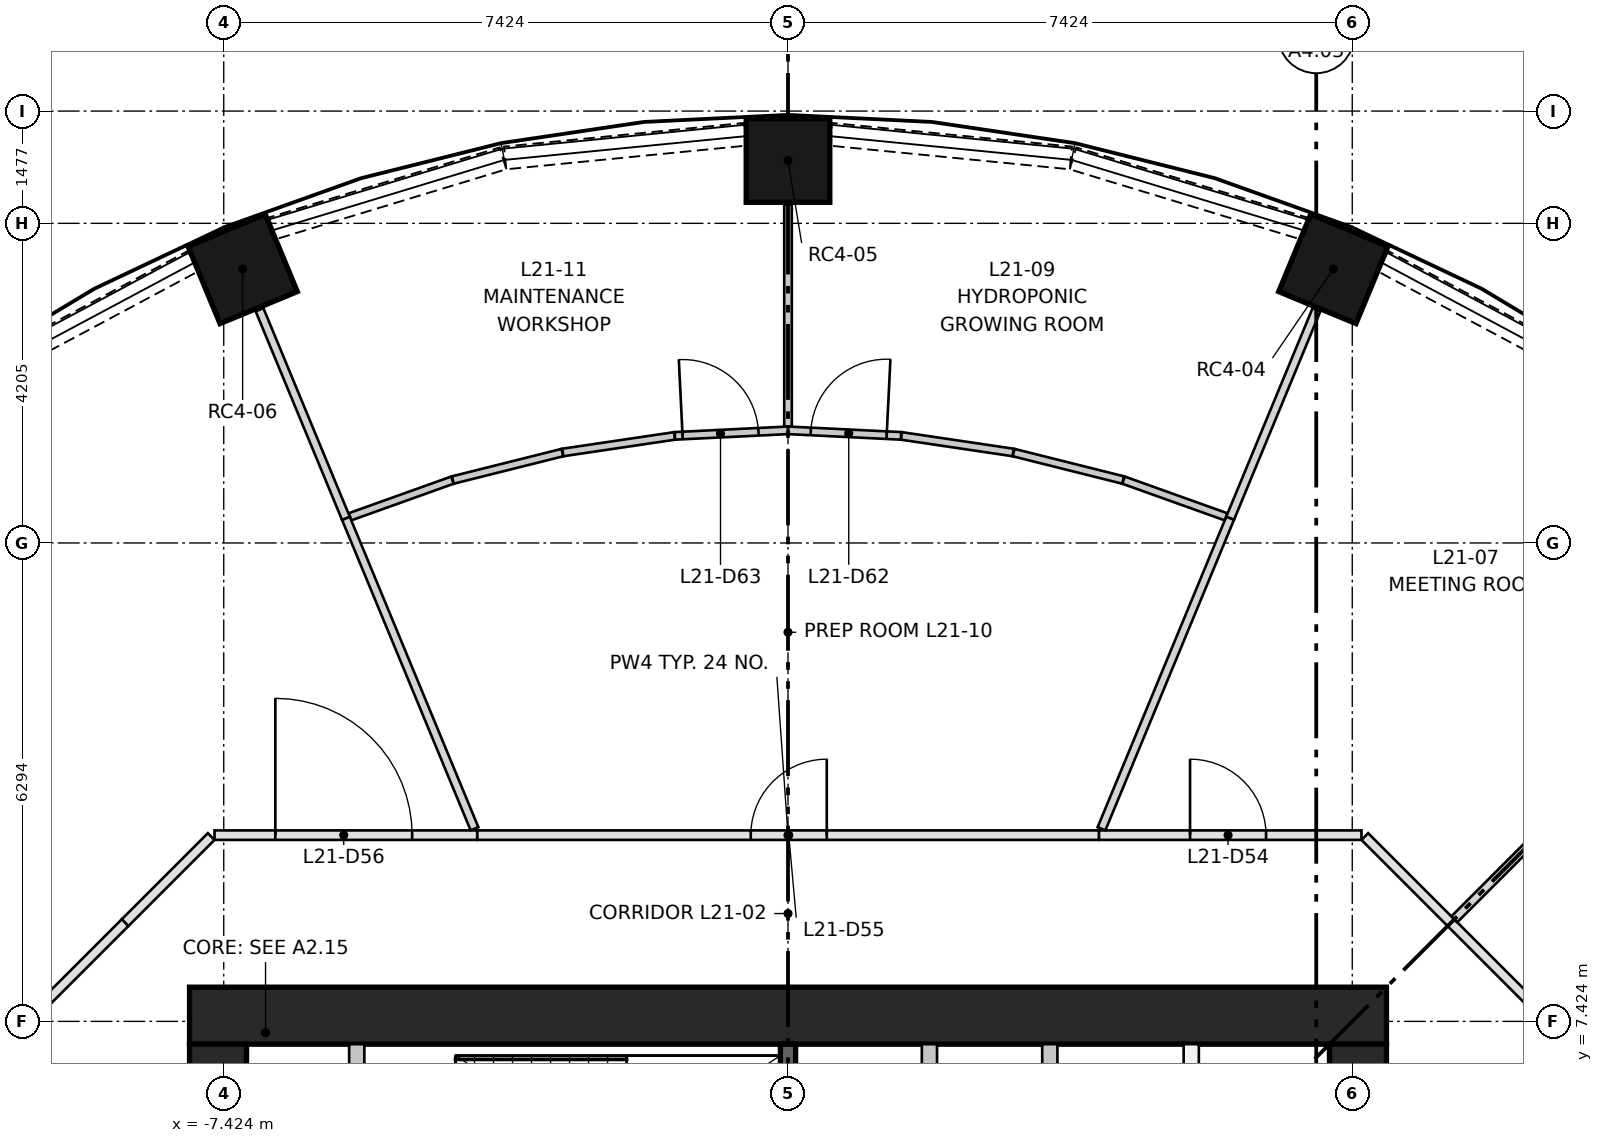
"""IFC4 building model, lengths in metres.
Left out: names, types, materials, properties, quantities, classifications, styles, units other than length and angle.
Written with IfcOpenShell. Run it as: python <this file> out.ifc"""

import sys

from ifc_helpers import new_model, si_unit, direction, frame, frame_2d, origin, origin_2d, place, context, subcontext, project, spatial, rectangle, extrude, element, fill, save


model = new_model("IFC4")
c1 = context("Model", 3, precision=1e-05, world=origin(), true_north=direction((0.0, 1.0)))
c2 = subcontext(c1, "Body", "Model", "MODEL_VIEW")
j1 = project(units=[si_unit("LENGTHUNIT", "METRE"), si_unit("PLANEANGLEUNIT", "RADIAN")], contexts=[c1])
p1 = place(None, origin())
s1 = spatial("IfcSite", under=j1, at=p1, CompositionType="ELEMENT")
p2 = place(p1, origin())
s2 = spatial("IfcBuilding", under=s1, at=p2, CompositionType="ELEMENT")
p3 = place(p2, frame((0.0, 0.0, 83.7)))
s3 = spatial("IfcBuildingStorey", under=s2, at=p3, CompositionType="ELEMENT", Elevation=83.7)
for number, where, z_axis, x_axis in (
    (1, (7.175, 17.323, 0.0), (0.0, 0.0, 1.0), (0.383, 0.924, 0.0)),
    (2, (0.0, 18.75, 0.0), (0.0, 0.0, 1.0), (0.0, 1.0, 0.0)),
    (3, (-7.175, 17.323, 0.0), (0.0, 0.0, 1.0), (-0.383, 0.924, 0.0)),
):
    element("IfcColumn", number, at=place(p3, frame(where, z_axis=z_axis, x_axis=x_axis)), inside=s3, PredefinedType="COLUMN", context=c2, shape_type="SweptSolid", body=[
        extrude(rectangle(XDim=1.1, YDim=1.1, at=origin_2d()), origin(), (0.0, 0.0, 1.0), 3.65),
    ])
p4 = place(p3, frame((-7.874, 7.499, 0.0), z_axis=(0.0, 0.0, 1.0), x_axis=(1.0, 0.0, 0.0)))
e4 = element("IfcWall", 4, at=p4, inside=s3, PredefinedType="SHEAR", context=c2, shape_type="SweptSolid", body=[
    extrude(rectangle(XDim=15.748, YDim=0.75, at=frame_2d((7.874, 0.0))), origin(), (0.0, 0.0, 1.0), 3.65),
])
p5 = place(p3, frame((-7.499, -7.124, 0.0), z_axis=(0.0, 0.0, 1.0), x_axis=(0.0, 1.0, 0.0)))
e5 = element("IfcWall", 5, at=p5, inside=s3, PredefinedType="SHEAR", context=c2, shape_type="SweptSolid", body=[
    extrude(rectangle(XDim=14.248, YDim=0.75, at=frame_2d((7.124, 0.0))), origin(), (0.0, 0.0, 1.0), 3.65),
])
p6 = place(p5, frame((6.624, 0.0, 0.0)))
e6 = element("IfcOpeningElement", 6, at=p6, cuts=e5, PredefinedType="OPENING", context=c2, shape_type="SweptSolid", body=[
    extrude(rectangle(XDim=1.0, YDim=2.1, at=frame_2d((0.5, 1.05))), frame((0.0, 0.385, 0.0), z_axis=(0.0, -1.0, 0.0), x_axis=(1.0, 0.0, 0.0)), (0.0, 0.0, 1.0), 0.77),
])
p7 = place(p5, frame((3.5, 0.0, 0.0)))
e7 = element("IfcOpeningElement", 7, at=p7, cuts=e5, PredefinedType="OPENING", context=c2, shape_type="SweptSolid", body=[
    extrude(rectangle(XDim=1.8, YDim=2.1, at=frame_2d((0.9, 1.05))), frame((0.0, 0.385, 0.0), z_axis=(0.0, -1.0, 0.0), x_axis=(1.0, 0.0, 0.0)), (0.0, 0.0, 1.0), 0.77),
])
p8 = place(p5, frame((8.948, 0.0, 0.0)))
e8 = element("IfcOpeningElement", 8, at=p8, cuts=e5, PredefinedType="OPENING", context=c2, shape_type="SweptSolid", body=[
    extrude(rectangle(XDim=1.8, YDim=2.1, at=frame_2d((0.9, 1.05))), frame((0.0, 0.385, 0.0), z_axis=(0.0, -1.0, 0.0), x_axis=(1.0, 0.0, 0.0)), (0.0, 0.0, 1.0), 0.77),
])
p9 = place(p5, frame((12.124, 0.0, 0.0)))
e9 = element("IfcOpeningElement", 9, at=p9, cuts=e5, PredefinedType="OPENING", context=c2, shape_type="SweptSolid", body=[
    extrude(rectangle(XDim=1.0, YDim=2.1, at=frame_2d((0.5, 1.05))), frame((0.0, 0.385, 0.0), z_axis=(0.0, -1.0, 0.0), x_axis=(1.0, 0.0, 0.0)), (0.0, 0.0, 1.0), 0.77),
])
p10 = place(p3, frame((7.499, -7.124, 0.0), z_axis=(0.0, 0.0, 1.0), x_axis=(0.0, 1.0, 0.0)))
e10 = element("IfcWall", 10, at=p10, inside=s3, PredefinedType="SHEAR", context=c2, shape_type="SweptSolid", body=[
    extrude(rectangle(XDim=14.248, YDim=0.75, at=frame_2d((7.124, 0.0))), origin(), (0.0, 0.0, 1.0), 3.65),
])
p11 = place(p10, frame((6.624, 0.0, 0.0)))
e11 = element("IfcOpeningElement", 11, at=p11, cuts=e10, PredefinedType="OPENING", context=c2, shape_type="SweptSolid", body=[
    extrude(rectangle(XDim=1.0, YDim=2.1, at=frame_2d((0.5, 1.05))), frame((0.0, 0.385, 0.0), z_axis=(0.0, -1.0, 0.0), x_axis=(1.0, 0.0, 0.0)), (0.0, 0.0, 1.0), 0.77),
])
p12 = place(p10, frame((3.5, 0.0, 0.0)))
e12 = element("IfcOpeningElement", 12, at=p12, cuts=e10, PredefinedType="OPENING", context=c2, shape_type="SweptSolid", body=[
    extrude(rectangle(XDim=1.8, YDim=2.1, at=frame_2d((0.9, 1.05))), frame((0.0, 0.385, 0.0), z_axis=(0.0, -1.0, 0.0), x_axis=(1.0, 0.0, 0.0)), (0.0, 0.0, 1.0), 0.77),
])
p13 = place(p10, frame((8.948, 0.0, 0.0)))
e13 = element("IfcOpeningElement", 13, at=p13, cuts=e10, PredefinedType="OPENING", context=c2, shape_type="SweptSolid", body=[
    extrude(rectangle(XDim=1.8, YDim=2.1, at=frame_2d((0.9, 1.05))), frame((0.0, 0.385, 0.0), z_axis=(0.0, -1.0, 0.0), x_axis=(1.0, 0.0, 0.0)), (0.0, 0.0, 1.0), 0.77),
])
p14 = place(p3, frame((0.0, 5.574, 0.0), z_axis=(0.0, 0.0, 1.0), x_axis=(0.0, 1.0, 0.0)))
e14 = element("IfcWall", 14, at=p14, inside=s3, PredefinedType="SHEAR", context=c2, shape_type="SweptSolid", body=[
    extrude(rectangle(XDim=1.55, YDim=0.2, at=frame_2d((0.775, 0.0))), origin(), (0.0, 0.0, 1.0), 3.3),
])
for number, where, z_axis, x_axis in (
    (15, (1.861, 4.174, 0.0), (0.0, 0.0, 1.0), (0.0, 1.0, 0.0)),
    (16, (3.445, 4.174, 0.0), (0.0, 0.0, 1.0), (0.0, 1.0, 0.0)),
    (17, (5.305, 4.174, 0.0), (0.0, 0.0, 1.0), (0.0, 1.0, 0.0)),
):
    element("IfcWall", number, at=place(p3, frame(where, z_axis=z_axis, x_axis=x_axis)), inside=s3, PredefinedType="PARTITIONING", context=c2, shape_type="SweptSolid", body=[
        extrude(rectangle(XDim=2.95, YDim=0.2, at=frame_2d((1.475, 0.0))), origin(), (0.0, 0.0, 1.0), 3.3),
    ])
p15 = place(p3, frame((-5.674, 4.174, 0.0), z_axis=(0.0, 0.0, 1.0), x_axis=(0.0, 1.0, 0.0)))
e18 = element("IfcWall", 18, at=p15, inside=s3, PredefinedType="PARTITIONING", context=c2, shape_type="SweptSolid", body=[
    extrude(rectangle(XDim=2.95, YDim=0.2, at=frame_2d((1.475, 0.0))), origin(), (0.0, 0.0, 1.0), 3.3),
])
p16 = place(p15, frame((0.125, 0.0, 0.0)))
e19 = element("IfcOpeningElement", 19, at=p16, cuts=e18, PredefinedType="OPENING", context=c2, shape_type="SweptSolid", body=[
    extrude(rectangle(XDim=0.95, YDim=2.1, at=frame_2d((0.475, 1.05))), frame((0.0, 0.11, 0.0), z_axis=(0.0, -1.0, 0.0), x_axis=(1.0, 0.0, 0.0)), (0.0, 0.0, 1.0), 0.22),
])
p17 = place(p15, frame((1.725, 0.0, 0.0)))
e20 = element("IfcOpeningElement", 20, at=p17, cuts=e18, PredefinedType="OPENING", context=c2, shape_type="SweptSolid", body=[
    extrude(rectangle(XDim=0.95, YDim=2.1, at=frame_2d((0.475, 1.05))), frame((0.0, 0.11, 0.0), z_axis=(0.0, -1.0, 0.0), x_axis=(1.0, 0.0, 0.0)), (0.0, 0.0, 1.0), 0.22),
])
p18 = place(p3, frame((10.626, 15.929, 0.0), z_axis=(0.0, 0.0, 1.0), x_axis=(-0.88188808669, 0.471458802606, 0.0)))
e21 = element("IfcWall", 21, at=p18, inside=s3, PredefinedType="SOLIDWALL", context=c2, shape_type="SweptSolid", body=[
    extrude(rectangle(XDim=3.172, YDim=0.3, at=frame_2d((1.586, 0.0))), origin(), (0.0, 0.0, 1.0), 0.9),
])
p19 = place(p3, frame((6.787, 17.856, 0.0), z_axis=(0.0, 0.0, 1.0), x_axis=(-0.956927923582, 0.290325591482, 0.0)))
e22 = element("IfcWall", 22, at=p19, inside=s3, PredefinedType="SOLIDWALL", context=c2, shape_type="SweptSolid", body=[
    extrude(rectangle(XDim=3.173, YDim=0.3, at=frame_2d((1.586, 0.0))), origin(), (0.0, 0.0, 1.0), 0.9),
])
for number, where, z_axis, x_axis in (
    (23, (3.721, 18.783, 0.0), (0.0, 0.0, 1.0), (-0.995, 0.098, 0.0)),
    (24, (-0.564, 19.094, 0.0), (0.0, 0.0, 1.0), (-0.995, -0.098, 0.0)),
):
    element("IfcWall", number, at=place(p3, frame(where, z_axis=z_axis, x_axis=x_axis)), inside=s3, PredefinedType="SOLIDWALL", context=c2, shape_type="SweptSolid", body=[
        extrude(rectangle(XDim=3.173, YDim=0.3, at=frame_2d((1.586, 0.0))), origin(), (0.0, 0.0, 1.0), 0.9),
    ])
p20 = place(p3, frame((-3.75, 18.778, 0.0), z_axis=(0.0, 0.0, 1.0), x_axis=(-0.956927923582, -0.290325591482, 0.0)))
e25 = element("IfcWall", 25, at=p20, inside=s3, PredefinedType="SOLIDWALL", context=c2, shape_type="SweptSolid", body=[
    extrude(rectangle(XDim=3.173, YDim=0.3, at=frame_2d((1.586, 0.0))), origin(), (0.0, 0.0, 1.0), 0.9),
])
p21 = place(p3, frame((-7.828, 17.425, 0.0), z_axis=(0.0, 0.0, 1.0), x_axis=(-0.88188808669, -0.471458802606, 0.0)))
e26 = element("IfcWall", 26, at=p21, inside=s3, PredefinedType="SOLIDWALL", context=c2, shape_type="SweptSolid", body=[
    extrude(rectangle(XDim=3.172, YDim=0.3, at=frame_2d((1.586, 0.0))), origin(), (0.0, 0.0, 1.0), 0.9),
])
p22 = place(p3, frame((8.722, 8.722, 0.0), z_axis=(0.0, 0.0, 1.0), x_axis=(0.70718294931, -0.707030604857, 0.0)))
e27 = element("IfcWall", 27, at=p22, inside=s3, PredefinedType="PARTITIONING", context=c2, shape_type="SweptSolid", body=[
    extrude(rectangle(XDim=1.603, YDim=0.125, at=frame_2d((0.801, 0.0))), origin(), (0.0, 0.0, 1.0), 3.3),
])
p23 = place(p3, frame((4.09, 9.874, 0.0), z_axis=(0.0, 0.0, 1.0), x_axis=(1.0, 0.0, 0.0)))
e28 = element("IfcWall", 28, at=p23, inside=s3, PredefinedType="PARTITIONING", context=c2, shape_type="SweptSolid", body=[
    extrude(rectangle(XDim=3.455, YDim=0.125, at=frame_2d((1.728, 0.0))), origin(), (0.0, 0.0, 1.0), 3.3),
])
p24 = place(p23, frame((1.2, 0.0, 0.0)))
e29 = element("IfcOpeningElement", 29, at=p24, cuts=e28, PredefinedType="OPENING", context=c2, shape_type="SweptSolid", body=[
    extrude(rectangle(XDim=1.0, YDim=2.1, at=frame_2d((0.5, 1.05))), frame((0.0, 0.073, 0.0), z_axis=(0.0, -1.0, 0.0), x_axis=(1.0, 0.0, 0.0)), (0.0, 0.0, 1.0), 0.145),
])
p25 = place(p3, frame((7.589, 9.856, 0.0), z_axis=(0.0, 0.0, 1.0), x_axis=(0.707030604857, -0.70718294931, 0.0)))
e30 = element("IfcWall", 30, at=p25, inside=s3, PredefinedType="PARTITIONING", context=c2, shape_type="SweptSolid", body=[
    extrude(rectangle(XDim=1.603, YDim=0.125, at=frame_2d((0.801, 0.0))), origin(), (0.0, 0.0, 1.0), 3.3),
])
p26 = place(p3, frame((-4.09, 9.874, 0.0), z_axis=(0.0, 0.0, 1.0), x_axis=(1.0, 0.0, 0.0)))
e31 = element("IfcWall", 31, at=p26, inside=s3, PredefinedType="PARTITIONING", context=c2, shape_type="SweptSolid", body=[
    extrude(rectangle(XDim=8.18, YDim=0.125, at=frame_2d((4.09, 0.0))), origin(), (0.0, 0.0, 1.0), 3.3),
])
p27 = place(p26, frame((3.6, 0.0, 0.0)))
e32 = element("IfcOpeningElement", 32, at=p27, cuts=e31, PredefinedType="OPENING", context=c2, shape_type="SweptSolid", body=[
    extrude(rectangle(XDim=1.0, YDim=2.1, at=frame_2d((0.5, 1.05))), frame((0.0, 0.073, 0.0), z_axis=(0.0, -1.0, 0.0), x_axis=(1.0, 0.0, 0.0)), (0.0, 0.0, 1.0), 0.145),
])
p28 = place(p3, frame((-8.722, 8.722, 0.0), z_axis=(0.0, 0.0, 1.0), x_axis=(0.707030604857, 0.70718294931, 0.0)))
e33 = element("IfcWall", 33, at=p28, inside=s3, PredefinedType="PARTITIONING", context=c2, shape_type="SweptSolid", body=[
    extrude(rectangle(XDim=1.603, YDim=0.125, at=frame_2d((0.801, 0.0))), origin(), (0.0, 0.0, 1.0), 3.3),
])
p29 = place(p3, frame((-7.545, 9.874, 0.0), z_axis=(0.0, 0.0, 1.0), x_axis=(1.0, 0.0, 0.0)))
e34 = element("IfcWall", 34, at=p29, inside=s3, PredefinedType="PARTITIONING", context=c2, shape_type="SweptSolid", body=[
    extrude(rectangle(XDim=3.455, YDim=0.125, at=frame_2d((1.728, 0.0))), origin(), (0.0, 0.0, 1.0), 3.3),
])
p30 = place(p29, frame((0.8, 0.0, 0.0)))
e35 = element("IfcOpeningElement", 35, at=p30, cuts=e34, PredefinedType="OPENING", context=c2, shape_type="SweptSolid", body=[
    extrude(rectangle(XDim=1.8, YDim=2.1, at=frame_2d((0.9, 1.05))), frame((0.0, 0.073, 0.0), z_axis=(0.0, -1.0, 0.0), x_axis=(1.0, 0.0, 0.0)), (0.0, 0.0, 1.0), 0.145),
])
p31 = place(p3, frame((-9.856, 7.589, 0.0), z_axis=(0.0, 0.0, 1.0), x_axis=(0.70718294931, 0.707030604857, 0.0)))
e36 = element("IfcWall", 36, at=p31, inside=s3, PredefinedType="PARTITIONING", context=c2, shape_type="SweptSolid", body=[
    extrude(rectangle(XDim=1.603, YDim=0.125, at=frame_2d((0.801, 0.0))), origin(), (0.0, 0.0, 1.0), 3.3),
])
p32 = place(p3, frame((12.848, 12.848, 0.0), z_axis=(0.0, 0.0, 1.0), x_axis=(-0.707106781187, -0.707106781187, 0.0)))
e37 = element("IfcWall", 37, at=p32, inside=s3, PredefinedType="PARTITIONING", context=c2, shape_type="SweptSolid", body=[
    extrude(rectangle(XDim=5.772, YDim=0.11, at=frame_2d((2.886, 0.0))), origin(), (0.0, 0.0, 1.0), 3.3),
])
p33 = place(p3, frame((5.817, 14.043, 0.0), z_axis=(0.0, 0.0, 1.0), x_axis=(0.382659139036, 0.923889594764, 0.0)))
e38 = element("IfcWall", 38, at=p33, inside=s3, PredefinedType="PARTITIONING", context=c2, shape_type="SweptSolid", body=[
    extrude(rectangle(XDim=2.97, YDim=0.11, at=frame_2d((1.485, 0.0))), origin(), (0.0, 0.0, 1.0), 3.3),
])
p34 = place(p3, frame((4.125, 9.958, 0.0), z_axis=(0.0, 0.0, 1.0), x_axis=(0.382709362011, 0.923868791674, 0.0)))
e39 = element("IfcWall", 39, at=p34, inside=s3, PredefinedType="PARTITIONING", context=c2, shape_type="SweptSolid", body=[
    extrude(rectangle(XDim=4.422, YDim=0.11, at=frame_2d((2.211, 0.0))), origin(), (0.0, 0.0, 1.0), 3.3),
])
p35 = place(p3, frame((0.0, 15.2, 0.0), z_axis=(0.0, 0.0, 1.0), x_axis=(0.998797711146, -0.049021752402, 0.0)))
e40 = element("IfcWall", 40, at=p35, inside=s3, PredefinedType="PARTITIONING", context=c2, shape_type="SweptSolid", body=[
    extrude(rectangle(XDim=1.489, YDim=0.1, at=frame_2d((0.745, 0.0))), origin(), (0.0, 0.0, 1.0), 3.3),
])
p36 = place(p35, frame((0.3, 0.0, 0.0)))
e41 = element("IfcOpeningElement", 41, at=p36, cuts=e40, PredefinedType="OPENING", context=c2, shape_type="SweptSolid", body=[
    extrude(rectangle(XDim=1.0, YDim=2.1, at=frame_2d((0.5, 1.05))), frame((0.0, 0.06, 0.0), z_axis=(0.0, -1.0, 0.0), x_axis=(1.0, 0.0, 0.0)), (0.0, 0.0, 1.0), 0.12),
])
p37 = place(p3, frame((2.963, 14.908, 0.0), z_axis=(0.0, 0.0, 1.0), x_axis=(-0.989166402168, 0.146798599525, 0.0)))
e42 = element("IfcWall", 42, at=p37, inside=s3, PredefinedType="PARTITIONING", context=c2, shape_type="SweptSolid", body=[
    extrude(rectangle(XDim=1.487, YDim=0.1, at=frame_2d((0.743, 0.0))), origin(), (0.0, 0.0, 1.0), 3.3),
])
p38 = place(p3, frame((4.41, 14.546, 0.0), z_axis=(0.0, 0.0, 1.0), x_axis=(-0.970055497102, 0.242883372306, 0.0)))
e43 = element("IfcWall", 43, at=p38, inside=s3, PredefinedType="PARTITIONING", context=c2, shape_type="SweptSolid", body=[
    extrude(rectangle(XDim=1.487, YDim=0.1, at=frame_2d((0.743, 0.0))), origin(), (0.0, 0.0, 1.0), 3.3),
])
p39 = place(p3, frame((5.763, 14.062, 0.0), z_axis=(0.0, 0.0, 1.0), x_axis=(-0.941587499657, 0.33676843749, 0.0)))
e44 = element("IfcWall", 44, at=p39, inside=s3, PredefinedType="PARTITIONING", context=c2, shape_type="SweptSolid", body=[
    extrude(rectangle(XDim=1.432, YDim=0.1, at=frame_2d((0.716, 0.0))), origin(), (0.0, 0.0, 1.0), 3.3),
])
p40 = place(p3, frame((0.0, 15.252, 0.0), z_axis=(0.0, 0.0, 1.0), x_axis=(0.0, 1.0, 0.0)))
e45 = element("IfcWall", 45, at=p40, inside=s3, PredefinedType="PARTITIONING", context=c2, shape_type="SweptSolid", body=[
    extrude(rectangle(XDim=2.917, YDim=0.1, at=frame_2d((1.459, 0.0))), origin(), (0.0, 0.0, 1.0), 3.3),
])
p41 = place(p3, frame((-5.763, 14.062, 0.0), z_axis=(0.0, 0.0, 1.0), x_axis=(0.941587499657, 0.33676843749, 0.0)))
e46 = element("IfcWall", 46, at=p41, inside=s3, PredefinedType="PARTITIONING", context=c2, shape_type="SweptSolid", body=[
    extrude(rectangle(XDim=1.432, YDim=0.1, at=frame_2d((0.716, 0.0))), origin(), (0.0, 0.0, 1.0), 3.3),
])
p42 = place(p3, frame((-4.41, 14.546, 0.0), z_axis=(0.0, 0.0, 1.0), x_axis=(0.970055497102, 0.242883372306, 0.0)))
e47 = element("IfcWall", 47, at=p42, inside=s3, PredefinedType="PARTITIONING", context=c2, shape_type="SweptSolid", body=[
    extrude(rectangle(XDim=1.487, YDim=0.1, at=frame_2d((0.743, 0.0))), origin(), (0.0, 0.0, 1.0), 3.3),
])
p43 = place(p3, frame((-2.963, 14.908, 0.0), z_axis=(0.0, 0.0, 1.0), x_axis=(0.989166402168, 0.146798599525, 0.0)))
e48 = element("IfcWall", 48, at=p43, inside=s3, PredefinedType="PARTITIONING", context=c2, shape_type="SweptSolid", body=[
    extrude(rectangle(XDim=1.487, YDim=0.1, at=frame_2d((0.743, 0.0))), origin(), (0.0, 0.0, 1.0), 3.3),
])
p44 = place(p3, frame((-1.487, 15.127, 0.0), z_axis=(0.0, 0.0, 1.0), x_axis=(0.998797711146, 0.049021752402, 0.0)))
e49 = element("IfcWall", 49, at=p44, inside=s3, PredefinedType="PARTITIONING", context=c2, shape_type="SweptSolid", body=[
    extrude(rectangle(XDim=1.489, YDim=0.1, at=frame_2d((0.745, 0.0))), origin(), (0.0, 0.0, 1.0), 3.3),
])
p45 = place(p44, frame((0.1, 0.0, 0.0)))
e50 = element("IfcOpeningElement", 50, at=p45, cuts=e49, PredefinedType="OPENING", context=c2, shape_type="SweptSolid", body=[
    extrude(rectangle(XDim=1.0, YDim=2.1, at=frame_2d((0.5, 1.05))), frame((0.0, 0.06, 0.0), z_axis=(0.0, -1.0, 0.0), x_axis=(1.0, 0.0, 0.0)), (0.0, 0.0, 1.0), 0.12),
])
p46 = place(p3, frame((-4.125, 9.958, 0.0), z_axis=(0.0, 0.0, 1.0), x_axis=(-0.382709362011, 0.923868791674, 0.0)))
e51 = element("IfcWall", 51, at=p46, inside=s3, PredefinedType="PARTITIONING", context=c2, shape_type="SweptSolid", body=[
    extrude(rectangle(XDim=4.422, YDim=0.11, at=frame_2d((2.211, 0.0))), origin(), (0.0, 0.0, 1.0), 3.3),
])
p47 = place(p3, frame((-5.817, 14.043, 0.0), z_axis=(0.0, 0.0, 1.0), x_axis=(-0.382659139036, 0.923889594764, 0.0)))
e52 = element("IfcWall", 52, at=p47, inside=s3, PredefinedType="PARTITIONING", context=c2, shape_type="SweptSolid", body=[
    extrude(rectangle(XDim=2.97, YDim=0.11, at=frame_2d((1.485, 0.0))), origin(), (0.0, 0.0, 1.0), 3.3),
])
p48 = place(p24, origin())
e53 = element("IfcDoor", 53, at=p48, inside=s3, OperationType="SINGLE_SWING_LEFT", PredefinedType="DOOR", context=c2, shape_type="SweptSolid", body=[
    extrude(rectangle(XDim=1.0, YDim=2.1, at=frame_2d((0.5, 1.05))), frame((0.0, 0.025, 0.0), z_axis=(0.0, -1.0, 0.0), x_axis=(1.0, 0.0, 0.0)), (0.0, 0.0, 1.0), 0.05),
])
fill(e29, e53)
p49 = place(p27, origin())
e54 = element("IfcDoor", 54, at=p49, inside=s3, OperationType="SINGLE_SWING_RIGHT", PredefinedType="DOOR", context=c2, shape_type="SweptSolid", body=[
    extrude(rectangle(XDim=1.0, YDim=2.1, at=frame_2d((0.5, 1.05))), frame((0.0, 0.025, 0.0), z_axis=(0.0, -1.0, 0.0), x_axis=(1.0, 0.0, 0.0)), (0.0, 0.0, 1.0), 0.05),
])
fill(e32, e54)
p50 = place(p30, origin())
e55 = element("IfcDoor", 55, at=p50, inside=s3, OperationType="DOUBLE_DOOR_SINGLE_SWING", PredefinedType="DOOR", context=c2, shape_type="SweptSolid", body=[
    extrude(rectangle(XDim=1.8, YDim=2.1, at=frame_2d((0.9, 1.05))), frame((0.0, 0.025, 0.0), z_axis=(0.0, -1.0, 0.0), x_axis=(1.0, 0.0, 0.0)), (0.0, 0.0, 1.0), 0.05),
])
fill(e35, e55)
p51 = place(p36, origin())
e56 = element("IfcDoor", 56, at=p51, inside=s3, OperationType="SINGLE_SWING_RIGHT", PredefinedType="DOOR", context=c2, shape_type="SweptSolid", body=[
    extrude(rectangle(XDim=1.0, YDim=2.1, at=frame_2d((0.5, 1.05))), frame((0.0, 0.025, 0.0), z_axis=(0.0, -1.0, 0.0), x_axis=(1.0, 0.0, 0.0)), (0.0, 0.0, 1.0), 0.05),
])
fill(e41, e56)
p52 = place(p45, origin())
e57 = element("IfcDoor", 57, at=p52, inside=s3, OperationType="SINGLE_SWING_LEFT", PredefinedType="DOOR", context=c2, shape_type="SweptSolid", body=[
    extrude(rectangle(XDim=1.0, YDim=2.1, at=frame_2d((0.5, 1.05))), frame((0.0, 0.025, 0.0), z_axis=(0.0, -1.0, 0.0), x_axis=(1.0, 0.0, 0.0)), (0.0, 0.0, 1.0), 0.05),
])
fill(e50, e57)
save(model, sys.argv[1])
